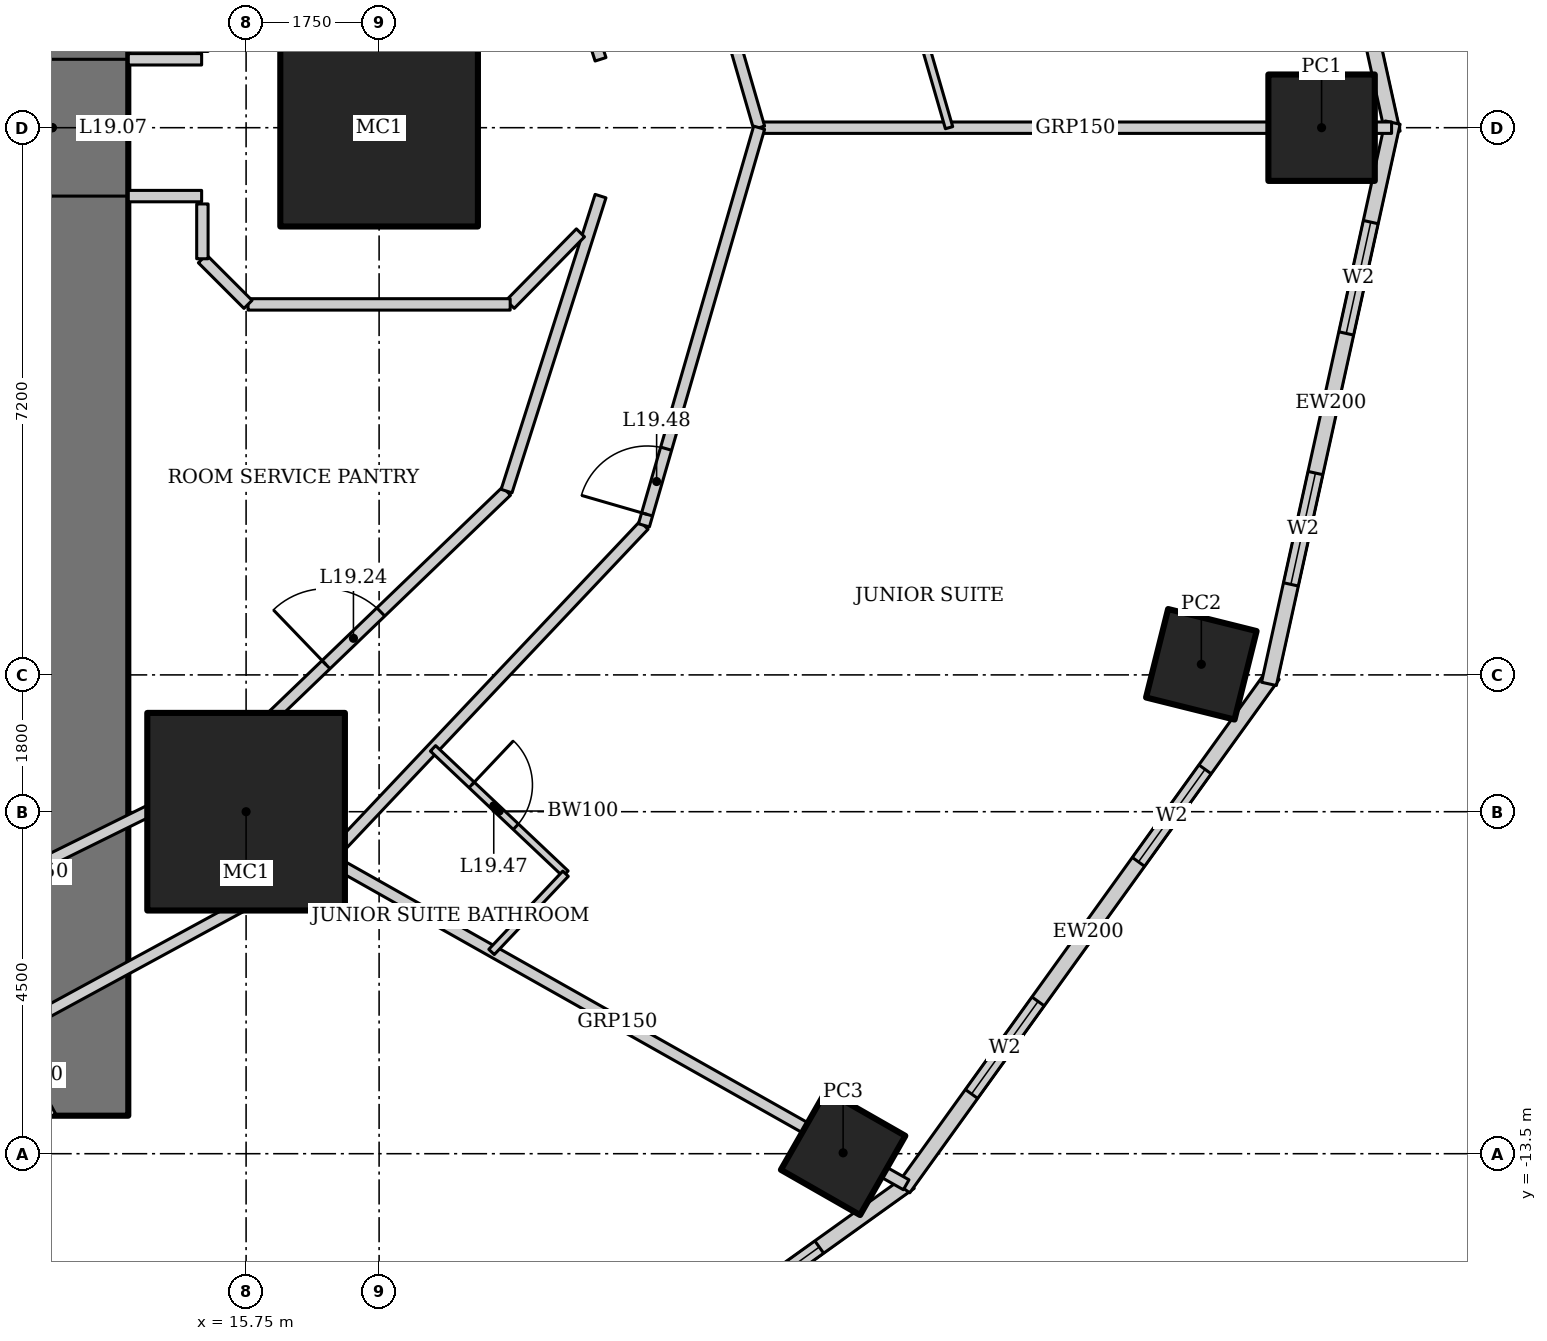
"""IFC4 building model, lengths in metres.
Left out: names, types, materials, properties, quantities, classifications, styles, units other than length and angle.
Written with IfcOpenShell. Run it as: python <this file> out.ifc"""

import sys

from ifc_helpers import new_model, si_unit, direction, frame, frame_2d, origin, origin_2d, place, context, subcontext, project, spatial, rectangle, hollow_rectangle, extrude, element, fill, save


model = new_model("IFC4")
c1 = context("Model", 3, precision=1e-05, world=origin(), true_north=direction((0.0, 1.0)))
c2 = subcontext(c1, "Body", "Model", "MODEL_VIEW")
j1 = project(units=[si_unit("LENGTHUNIT", "METRE"), si_unit("PLANEANGLEUNIT", "RADIAN")], contexts=[c1])
p1 = place(None, origin())
s1 = spatial("IfcSite", under=j1, at=p1, CompositionType="ELEMENT")
p2 = place(p1, origin())
s2 = spatial("IfcBuilding", under=s1, at=p2, CompositionType="ELEMENT")
p3 = place(p2, frame((0.0, 0.0, 83.8)))
s3 = spatial("IfcBuildingStorey", under=s2, at=p3, CompositionType="ELEMENT", Elevation=83.8)
for number, where, z_axis, x_axis in (
    (1, (17.5, 0.0, 0.0), (0.0, 0.0, 1.0), (1.0, 0.0, 0.0)),
    (2, (15.75, -9.0, 0.0), (0.0, 0.0, 1.0), (1.0, 0.0, 0.0)),
):
    element("IfcColumn", number, at=place(p3, frame(where, z_axis=z_axis, x_axis=x_axis)), inside=s3, PredefinedType="COLUMN", context=c2, shape_type="SweptSolid", body=[
        extrude(hollow_rectangle(XDim=2.6, YDim=2.6, WallThickness=0.13, at=origin_2d()), origin(), (0.0, 0.0, 1.0), 3.6),
    ])
p4 = place(p3, frame((29.9, 0.0, 0.0), z_axis=(0.0, 0.0, 1.0), x_axis=(1.0, 0.0, 0.0)))
e3 = element("IfcColumn", 3, at=p4, inside=s3, PredefinedType="COLUMN", context=c2, shape_type="SweptSolid", body=[
    extrude(hollow_rectangle(XDim=1.4, YDim=1.4, WallThickness=0.1, at=origin_2d()), origin(), (0.0, 0.0, 1.0), 3.6),
])
p5 = place(p3, frame((23.605, -13.489, 0.0), z_axis=(0.0, 0.0, 1.0), x_axis=(0.496139221777, 0.86824298017, 0.0)))
e4 = element("IfcColumn", 4, at=p5, inside=s3, PredefinedType="COLUMN", context=c2, shape_type="SweptSolid", body=[
    extrude(hollow_rectangle(XDim=1.2, YDim=1.2, WallThickness=0.12, at=origin_2d()), origin(), (0.0, 0.0, 1.0), 3.6),
])
p6 = place(p3, frame((28.318, -7.06, 0.0), z_axis=(0.0, 0.0, 1.0), x_axis=(0.2419218956, 0.970295726276, 0.0)))
e5 = element("IfcColumn", 5, at=p6, inside=s3, PredefinedType="COLUMN", context=c2, shape_type="SweptSolid", body=[
    extrude(hollow_rectangle(XDim=1.2, YDim=1.2, WallThickness=0.1, at=origin_2d()), origin(), (0.0, 0.0, 1.0), 3.6),
])
p7 = place(p3, frame((13.2, -13.0, 0.0), z_axis=(0.0, 0.0, 1.0), x_axis=(0.0, 1.0, 0.0)))
e6 = element("IfcWall", 6, at=p7, inside=s3, PredefinedType="SHEAR", context=c2, shape_type="SweptSolid", body=[
    extrude(rectangle(XDim=26.0, YDim=2.0, at=frame_2d((13.0, 0.0))), origin(), (0.0, 0.0, 1.0), 3.6),
])
p8 = place(p7, frame((12.1, 0.0, 0.0)))
e7 = element("IfcOpeningElement", 7, at=p8, cuts=e6, PredefinedType="OPENING", context=c2, shape_type="SweptSolid", body=[
    extrude(rectangle(XDim=1.8, YDim=2.1, at=frame_2d((0.9, 1.05))), frame((0.0, 1.01, 0.0), z_axis=(0.0, -1.0, 0.0), x_axis=(1.0, 0.0, 0.0)), (0.0, 0.0, 1.0), 2.02),
])
p9 = place(p3, frame((30.835, -0.067, 0.0), z_axis=(0.0, 0.0, 1.0), x_axis=(-0.215238065514, 0.976561608478, 0.0)))
e8 = element("IfcWall", 8, at=p9, inside=s3, PredefinedType="SOLIDWALL", context=c2, shape_type="SweptSolid", body=[
    extrude(rectangle(XDim=7.562, YDim=0.2, at=frame_2d((3.781, 0.0))), origin(), (0.0, 0.0, 1.0), 3.45),
])
p10 = place(p9, frame((1.341, 0.0, 0.5)))
e9 = element("IfcOpeningElement", 9, at=p10, cuts=e8, PredefinedType="OPENING", context=c2, shape_type="SweptSolid", body=[
    extrude(rectangle(XDim=1.5, YDim=2.2, at=frame_2d((0.75, 1.1))), frame((0.0, 0.11, 0.0), z_axis=(0.0, -1.0, 0.0), x_axis=(1.0, 0.0, 0.0)), (0.0, 0.0, 1.0), 0.22),
])
p11 = place(p9, frame((4.722, 0.0, 0.5)))
e10 = element("IfcOpeningElement", 10, at=p11, cuts=e8, PredefinedType="OPENING", context=c2, shape_type="SweptSolid", body=[
    extrude(rectangle(XDim=1.5, YDim=2.2, at=frame_2d((0.75, 1.1))), frame((0.0, 0.11, 0.0), z_axis=(0.0, -1.0, 0.0), x_axis=(1.0, 0.0, 0.0)), (0.0, 0.0, 1.0), 0.22),
])
p12 = place(p3, frame((17.929, -18.572, 0.0), z_axis=(0.0, 0.0, 1.0), x_axis=(0.812791321576, 0.582554948112, 0.0)))
e11 = element("IfcWall", 11, at=p12, inside=s3, PredefinedType="SOLIDWALL", context=c2, shape_type="SweptSolid", body=[
    extrude(rectangle(XDim=8.063, YDim=0.2, at=frame_2d((4.032, 0.0))), origin(), (0.0, 0.0, 1.0), 3.45),
])
p13 = place(p12, frame((1.466, 0.0, 0.5)))
e12 = element("IfcOpeningElement", 12, at=p13, cuts=e11, PredefinedType="OPENING", context=c2, shape_type="SweptSolid", body=[
    extrude(rectangle(XDim=1.5, YDim=2.2, at=frame_2d((0.75, 1.1))), frame((0.0, 0.11, 0.0), z_axis=(0.0, -1.0, 0.0), x_axis=(1.0, 0.0, 0.0)), (0.0, 0.0, 1.0), 0.22),
])
p14 = place(p12, frame((5.097, 0.0, 0.5)))
e13 = element("IfcOpeningElement", 13, at=p14, cuts=e11, PredefinedType="OPENING", context=c2, shape_type="SweptSolid", body=[
    extrude(rectangle(XDim=1.5, YDim=2.2, at=frame_2d((0.75, 1.1))), frame((0.0, 0.11, 0.0), z_axis=(0.0, -1.0, 0.0), x_axis=(1.0, 0.0, 0.0)), (0.0, 0.0, 1.0), 0.22),
])
p15 = place(p3, frame((24.4, -13.957, 0.0), z_axis=(0.0, 0.0, 1.0), x_axis=(0.583937613703, 0.811798536155, 0.0)))
e14 = element("IfcWall", 14, at=p15, inside=s3, PredefinedType="SOLIDWALL", context=c2, shape_type="SweptSolid", body=[
    extrude(rectangle(XDim=8.323, YDim=0.2, at=frame_2d((4.162, 0.0))), origin(), (0.0, 0.0, 1.0), 3.45),
])
p16 = place(p15, frame((1.531, 0.0, 0.5)))
e15 = element("IfcOpeningElement", 15, at=p16, cuts=e14, PredefinedType="OPENING", context=c2, shape_type="SweptSolid", body=[
    extrude(rectangle(XDim=1.5, YDim=2.2, at=frame_2d((0.75, 1.1))), frame((0.0, 0.11, 0.0), z_axis=(0.0, -1.0, 0.0), x_axis=(1.0, 0.0, 0.0)), (0.0, 0.0, 1.0), 0.22),
])
p17 = place(p15, frame((5.292, 0.0, 0.5)))
e16 = element("IfcOpeningElement", 16, at=p17, cuts=e14, PredefinedType="OPENING", context=c2, shape_type="SweptSolid", body=[
    extrude(rectangle(XDim=1.5, YDim=2.2, at=frame_2d((0.75, 1.1))), frame((0.0, 0.11, 0.0), z_axis=(0.0, -1.0, 0.0), x_axis=(1.0, 0.0, 0.0)), (0.0, 0.0, 1.0), 0.22),
])
p18 = place(p3, frame((29.208, -7.318, 0.0), z_axis=(0.0, 0.0, 1.0), x_axis=(0.215238065514, 0.976561608478, 0.0)))
e17 = element("IfcWall", 17, at=p18, inside=s3, PredefinedType="SOLIDWALL", context=c2, shape_type="SweptSolid", body=[
    extrude(rectangle(XDim=7.562, YDim=0.2, at=frame_2d((3.781, 0.0))), origin(), (0.0, 0.0, 1.0), 3.45),
])
p19 = place(p18, frame((1.341, 0.0, 0.5)))
e18 = element("IfcOpeningElement", 18, at=p19, cuts=e17, PredefinedType="OPENING", context=c2, shape_type="SweptSolid", body=[
    extrude(rectangle(XDim=1.5, YDim=2.2, at=frame_2d((0.75, 1.1))), frame((0.0, 0.11, 0.0), z_axis=(0.0, -1.0, 0.0), x_axis=(1.0, 0.0, 0.0)), (0.0, 0.0, 1.0), 0.22),
])
p20 = place(p18, frame((4.722, 0.0, 0.5)))
e19 = element("IfcOpeningElement", 19, at=p20, cuts=e17, PredefinedType="OPENING", context=c2, shape_type="SweptSolid", body=[
    extrude(rectangle(XDim=1.5, YDim=2.2, at=frame_2d((0.75, 1.1))), frame((0.0, 0.11, 0.0), z_axis=(0.0, -1.0, 0.0), x_axis=(1.0, 0.0, 0.0)), (0.0, 0.0, 1.0), 0.22),
])
p21 = place(p3, frame((30.821, 0.0, 0.0), z_axis=(0.0, 0.0, 1.0), x_axis=(-1.0, 0.0, 0.0)))
e20 = element("IfcWall", 20, at=p21, inside=s3, PredefinedType="PARTITIONING", context=c2, shape_type="SweptSolid", body=[
    extrude(rectangle(XDim=8.321, YDim=0.15, at=frame_2d((4.16, 0.0))), origin(), (0.0, 0.0, 1.0), 2.528),
])
p22 = place(p3, frame((24.435, -13.909, 0.0), z_axis=(0.0, 0.0, 1.0), x_axis=(-0.87090601027, 0.491449612143, 0.0)))
e21 = element("IfcWall", 21, at=p22, inside=s3, PredefinedType="PARTITIONING", context=c2, shape_type="SweptSolid", body=[
    extrude(rectangle(XDim=8.726, YDim=0.15, at=frame_2d((4.363, 0.0))), origin(), (0.0, 0.0, 1.0), 2.693),
])
p23 = place(p3, frame((22.5, 0.0, 0.0), z_axis=(0.0, 0.0, 1.0), x_axis=(-0.278247435376, 0.960509429785, 0.0)))
e22 = element("IfcWall", 22, at=p23, inside=s3, PredefinedType="PARTITIONING", context=c2, shape_type="SweptSolid", body=[
    extrude(rectangle(XDim=5.447, YDim=0.15, at=frame_2d((2.724, 0.0))), origin(), (0.0, 0.0, 1.0), 3.45),
])
p24 = place(p3, frame((11.888, -12.311, 0.0), z_axis=(0.0, 0.0, 1.0), x_axis=(0.878450059298, 0.477834169267, 0.0)))
e23 = element("IfcWall", 23, at=p24, inside=s3, PredefinedType="PARTITIONING", context=c2, shape_type="SweptSolid", body=[
    extrude(rectangle(XDim=5.631, YDim=0.15, at=frame_2d((2.815, 0.0))), origin(), (0.0, 0.0, 1.0), 3.45),
])
p25 = place(p3, frame((16.835, -9.62, 0.0), z_axis=(0.0, 0.0, 1.0), x_axis=(0.687062608696, 0.726598218916, 0.0)))
e24 = element("IfcWall", 24, at=p25, inside=s3, PredefinedType="PARTITIONING", context=c2, shape_type="SweptSolid", body=[
    extrude(rectangle(XDim=6.039, YDim=0.15, at=frame_2d((3.02, 0.0))), origin(), (0.0, 0.0, 1.0), 3.45),
])
p26 = place(p3, frame((20.984, -5.232, 0.0), z_axis=(0.0, 0.0, 1.0), x_axis=(0.278247435376, 0.960509429785, 0.0)))
e25 = element("IfcWall", 25, at=p26, inside=s3, PredefinedType="PARTITIONING", context=c2, shape_type="SweptSolid", body=[
    extrude(rectangle(XDim=5.447, YDim=0.15, at=frame_2d((2.724, 0.0))), origin(), (0.0, 0.0, 1.0), 3.45),
])
p27 = place(p26, frame((0.15, 0.0, 0.0)))
e26 = element("IfcOpeningElement", 26, at=p27, cuts=e25, PredefinedType="OPENING", context=c2, shape_type="SweptSolid", body=[
    extrude(rectangle(XDim=0.9, YDim=2.1, at=frame_2d((0.45, 1.05))), frame((0.0, 0.085, 0.0), z_axis=(0.0, -1.0, 0.0), x_axis=(1.0, 0.0, 0.0)), (0.0, 0.0, 1.0), 0.17),
])
p28 = place(p3, frame((20.413, 0.9, 0.0), z_axis=(0.0, 0.0, 1.0), x_axis=(-0.303505448228, 0.952829702988, 0.0)))
e27 = element("IfcWall", 27, at=p28, inside=s3, PredefinedType="PARTITIONING", context=c2, shape_type="SweptSolid", body=[
    extrude(rectangle(XDim=4.073, YDim=0.15, at=frame_2d((2.037, 0.0))), origin(), (0.0, 0.0, 1.0), 3.45),
])
p29 = place(p3, frame((10.551, -10.926, 0.0), z_axis=(0.0, 0.0, 1.0), x_axis=(0.89656943448, 0.442903205177, 0.0)))
e28 = element("IfcWall", 28, at=p29, inside=s3, PredefinedType="PARTITIONING", context=c2, shape_type="SweptSolid", body=[
    extrude(rectangle(XDim=5.126, YDim=0.15, at=frame_2d((2.563, 0.0))), origin(), (0.0, 0.0, 1.0), 3.45),
])
p30 = place(p3, frame((15.147, -8.656, 0.0), z_axis=(0.0, 0.0, 1.0), x_axis=(0.720837261072, 0.693104352209, 0.0)))
e29 = element("IfcWall", 29, at=p30, inside=s3, PredefinedType="PARTITIONING", context=c2, shape_type="SweptSolid", body=[
    extrude(rectangle(XDim=5.59, YDim=0.15, at=frame_2d((2.795, 0.0))), origin(), (0.0, 0.0, 1.0), 3.45),
])
p31 = place(p30, frame((2.295, 0.0, 0.0)))
e30 = element("IfcOpeningElement", 30, at=p31, cuts=e29, PredefinedType="OPENING", context=c2, shape_type="SweptSolid", body=[
    extrude(rectangle(XDim=1.0, YDim=2.1, at=frame_2d((0.5, 1.05))), frame((0.0, 0.085, 0.0), z_axis=(0.0, -1.0, 0.0), x_axis=(1.0, 0.0, 0.0)), (0.0, 0.0, 1.0), 0.17),
])
p32 = place(p3, frame((19.177, -4.781, 0.0), z_axis=(0.0, 0.0, 1.0), x_axis=(0.303505448228, 0.952829702988, 0.0)))
e31 = element("IfcWall", 31, at=p32, inside=s3, PredefinedType="PARTITIONING", context=c2, shape_type="SweptSolid", body=[
    extrude(rectangle(XDim=4.073, YDim=0.15, at=frame_2d((2.037, 0.0))), origin(), (0.0, 0.0, 1.0), 3.45),
])
p33 = place(p3, frame((24.249, 2.589, 0.0), z_axis=(0.0, 0.0, 1.0), x_axis=(0.278260412958, -0.960505670249, 0.0)))
e32 = element("IfcWall", 32, at=p33, inside=s3, PredefinedType="PARTITIONING", context=c2, shape_type="SweptSolid", body=[
    extrude(rectangle(XDim=2.695, YDim=0.1, at=frame_2d((1.348, 0.0))), origin(), (0.0, 0.0, 1.0), 3.45),
])
p34 = place(p3, frame((18.209, -8.167, 0.0), z_axis=(0.0, 0.0, 1.0), x_axis=(0.726567238928, -0.687095369885, 0.0)))
e33 = element("IfcWall", 33, at=p34, inside=s3, PredefinedType="PARTITIONING", context=c2, shape_type="SweptSolid", body=[
    extrude(rectangle(XDim=2.4, YDim=0.1, at=frame_2d((1.2, 0.0))), origin(), (0.0, 0.0, 1.0), 3.45),
])
p35 = place(p34, frame((0.7, 0.0, 0.0)))
e34 = element("IfcOpeningElement", 34, at=p35, cuts=e33, PredefinedType="OPENING", context=c2, shape_type="SweptSolid", body=[
    extrude(rectangle(XDim=0.8, YDim=2.1, at=frame_2d((0.4, 1.05))), frame((0.0, 0.06, 0.0), z_axis=(0.0, -1.0, 0.0), x_axis=(1.0, 0.0, 0.0)), (0.0, 0.0, 1.0), 0.12),
])
p36 = place(p3, frame((19.953, -9.816, 0.0), z_axis=(0.0, 0.0, 1.0), x_axis=(-0.687017997787, -0.726640399866, 0.0)))
e35 = element("IfcWall", 35, at=p36, inside=s3, PredefinedType="PARTITIONING", context=c2, shape_type="SweptSolid", body=[
    extrude(rectangle(XDim=1.417, YDim=0.1, at=frame_2d((0.708, 0.0))), origin(), (0.0, 0.0, 1.0), 3.45),
])
p37 = place(p3, frame((13.2, -13.0, 0.0), z_axis=(0.0, 0.0, 1.0), x_axis=(-0.477852414256, 0.878440134665, 0.0)))
e36 = element("IfcWall", 36, at=p37, inside=s3, PredefinedType="PARTITIONING", context=c2, shape_type="SweptSolid", body=[
    extrude(rectangle(XDim=1.232, YDim=0.1, at=frame_2d((0.616, 0.0))), origin(), (0.0, 0.0, 1.0), 3.45),
])
for number, where, z_axis, x_axis in (
    (37, (14.2, -0.9, 0.0), (0.0, 0.0, 1.0), (1.0, 0.0, 0.0)),
    (38, (14.2, 0.9, 0.0), (0.0, 0.0, 1.0), (1.0, 0.0, 0.0)),
):
    element("IfcWall", number, at=place(p3, frame(where, z_axis=z_axis, x_axis=x_axis)), inside=s3, PredefinedType="PARTITIONING", context=c2, shape_type="SweptSolid", body=[
        extrude(rectangle(XDim=0.965, YDim=0.15, at=frame_2d((0.482, 0.0))), origin(), (0.0, 0.0, 1.0), 3.45),
    ])
p38 = place(p3, frame((20.149, -1.384, 0.0), z_axis=(0.0, 0.0, 1.0), x_axis=(-0.700694560486, -0.713461374501, 0.0)))
e39 = element("IfcWall", 39, at=p38, inside=s3, PredefinedType="PARTITIONING", context=c2, shape_type="SweptSolid", body=[
    extrude(rectangle(XDim=1.32, YDim=0.15, at=frame_2d((0.66, 0.0))), origin(), (0.0, 0.0, 1.0), 3.45),
])
p39 = place(p3, frame((19.225, -2.325, 0.0), z_axis=(0.0, 0.0, 1.0), x_axis=(-1.0, 0.0, 0.0)))
e40 = element("IfcWall", 40, at=p39, inside=s3, PredefinedType="PARTITIONING", context=c2, shape_type="SweptSolid", body=[
    extrude(rectangle(XDim=3.449, YDim=0.15, at=frame_2d((1.725, 0.0))), origin(), (0.0, 0.0, 1.0), 3.45),
])
p40 = place(p3, frame((15.775, -2.325, 0.0), z_axis=(0.0, 0.0, 1.0), x_axis=(-0.707106781187, 0.707106781187, 0.0)))
e41 = element("IfcWall", 41, at=p40, inside=s3, PredefinedType="PARTITIONING", context=c2, shape_type="SweptSolid", body=[
    extrude(rectangle(XDim=0.849, YDim=0.15, at=frame_2d((0.425, 0.0))), origin(), (0.0, 0.0, 1.0), 3.45),
])
p41 = place(p3, frame((15.175, -1.725, 0.0), z_axis=(0.0, 0.0, 1.0), x_axis=(0.0, 1.0, 0.0)))
e42 = element("IfcWall", 42, at=p41, inside=s3, PredefinedType="PARTITIONING", context=c2, shape_type="SweptSolid", body=[
    extrude(rectangle(XDim=0.721, YDim=0.15, at=frame_2d((0.361, 0.0))), origin(), (0.0, 0.0, 1.0), 3.45),
])
p42 = place(p14, origin())
e43 = element("IfcWindow", 43, at=p42, inside=s3, PartitioningType="SINGLE_PANEL", PredefinedType="WINDOW", context=c2, shape_type="SweptSolid", body=[
    extrude(rectangle(XDim=1.5, YDim=2.2, at=frame_2d((0.75, 1.1))), frame((0.0, 0.03, 0.0), z_axis=(0.0, -1.0, 0.0), x_axis=(1.0, 0.0, 0.0)), (0.0, 0.0, 1.0), 0.06),
])
fill(e13, e43)
p43 = place(p16, origin())
e44 = element("IfcWindow", 44, at=p43, inside=s3, PartitioningType="SINGLE_PANEL", PredefinedType="WINDOW", context=c2, shape_type="SweptSolid", body=[
    extrude(rectangle(XDim=1.5, YDim=2.2, at=frame_2d((0.75, 1.1))), frame((0.0, 0.03, 0.0), z_axis=(0.0, -1.0, 0.0), x_axis=(1.0, 0.0, 0.0)), (0.0, 0.0, 1.0), 0.06),
])
fill(e15, e44)
p44 = place(p17, origin())
e45 = element("IfcWindow", 45, at=p44, inside=s3, PartitioningType="SINGLE_PANEL", PredefinedType="WINDOW", context=c2, shape_type="SweptSolid", body=[
    extrude(rectangle(XDim=1.5, YDim=2.2, at=frame_2d((0.75, 1.1))), frame((0.0, 0.03, 0.0), z_axis=(0.0, -1.0, 0.0), x_axis=(1.0, 0.0, 0.0)), (0.0, 0.0, 1.0), 0.06),
])
fill(e16, e45)
p45 = place(p19, origin())
e46 = element("IfcWindow", 46, at=p45, inside=s3, PartitioningType="SINGLE_PANEL", PredefinedType="WINDOW", context=c2, shape_type="SweptSolid", body=[
    extrude(rectangle(XDim=1.5, YDim=2.2, at=frame_2d((0.75, 1.1))), frame((0.0, 0.03, 0.0), z_axis=(0.0, -1.0, 0.0), x_axis=(1.0, 0.0, 0.0)), (0.0, 0.0, 1.0), 0.06),
])
fill(e18, e46)
p46 = place(p20, origin())
e47 = element("IfcWindow", 47, at=p46, inside=s3, PartitioningType="SINGLE_PANEL", PredefinedType="WINDOW", context=c2, shape_type="SweptSolid", body=[
    extrude(rectangle(XDim=1.5, YDim=2.2, at=frame_2d((0.75, 1.1))), frame((0.0, 0.03, 0.0), z_axis=(0.0, -1.0, 0.0), x_axis=(1.0, 0.0, 0.0)), (0.0, 0.0, 1.0), 0.06),
])
fill(e19, e47)
p47 = place(p8, origin())
e48 = element("IfcDoor", 48, at=p47, inside=s3, OperationType="DOUBLE_DOOR_DOUBLE_SWING", PredefinedType="DOOR", context=c2, shape_type="SweptSolid", body=[
    extrude(rectangle(XDim=1.8, YDim=2.1, at=frame_2d((0.9, 1.05))), frame((0.0, 0.025, 0.0), z_axis=(0.0, -1.0, 0.0), x_axis=(1.0, 0.0, 0.0)), (0.0, 0.0, 1.0), 0.05),
])
fill(e7, e48)
p48 = place(p31, origin())
e49 = element("IfcDoor", 49, at=p48, inside=s3, OperationType="SINGLE_SWING_LEFT", PredefinedType="DOOR", context=c2, shape_type="SweptSolid", body=[
    extrude(rectangle(XDim=1.0, YDim=2.1, at=frame_2d((0.5, 1.05))), frame((0.0, 0.025, 0.0), z_axis=(0.0, -1.0, 0.0), x_axis=(1.0, 0.0, 0.0)), (0.0, 0.0, 1.0), 0.05),
])
fill(e30, e49)
p49 = place(p35, origin())
e50 = element("IfcDoor", 50, at=p49, inside=s3, OperationType="SINGLE_SWING_LEFT", PredefinedType="DOOR", context=c2, shape_type="SweptSolid", body=[
    extrude(rectangle(XDim=0.8, YDim=2.1, at=frame_2d((0.4, 1.05))), frame((0.0, 0.025, 0.0), z_axis=(0.0, -1.0, 0.0), x_axis=(1.0, 0.0, 0.0)), (0.0, 0.0, 1.0), 0.05),
])
fill(e34, e50)
p50 = place(p27, origin())
e51 = element("IfcDoor", 51, at=p50, inside=s3, OperationType="SINGLE_SWING_LEFT", PredefinedType="DOOR", context=c2, shape_type="SweptSolid", body=[
    extrude(rectangle(XDim=0.9, YDim=2.1, at=frame_2d((0.45, 1.05))), frame((0.0, 0.025, 0.0), z_axis=(0.0, -1.0, 0.0), x_axis=(1.0, 0.0, 0.0)), (0.0, 0.0, 1.0), 0.05),
])
fill(e26, e51)
save(model, sys.argv[1])
